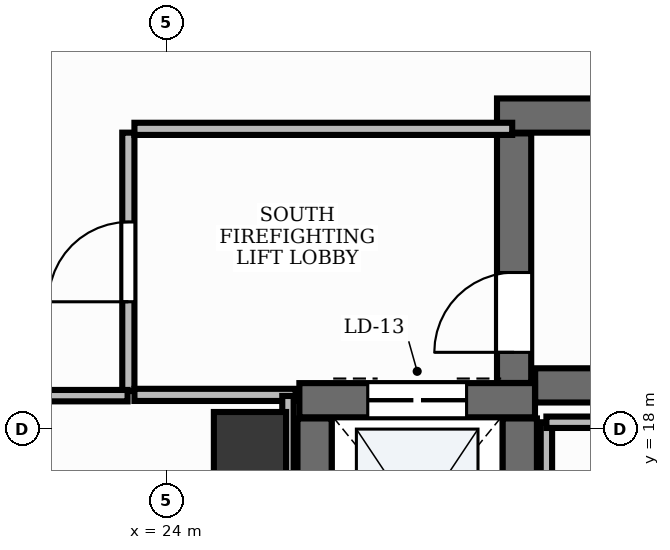
"""IFC4 building model, lengths in metres.
Left out: names, types, materials, properties, quantities, classifications, styles, units other than length and angle.
Written with IfcOpenShell. Run it as: python <this file> out.ifc"""

import sys

from ifc_helpers import new_model, si_unit, direction, frame, frame_2d, origin, origin_2d, place, context, subcontext, project, spatial, rectangle, extrude, element, fill, save


model = new_model("IFC4")
c1 = context("Model", 3, precision=1e-05, world=origin(), true_north=direction((0.0, 1.0)))
c2 = subcontext(c1, "Body", "Model", "MODEL_VIEW")
j1 = project(units=[si_unit("LENGTHUNIT", "METRE"), si_unit("PLANEANGLEUNIT", "RADIAN")], contexts=[c1])
p1 = place(None, origin())
s1 = spatial("IfcSite", under=j1, at=p1, CompositionType="ELEMENT")
p2 = place(p1, origin())
s2 = spatial("IfcBuilding", under=s1, at=p2, CompositionType="ELEMENT")
p3 = place(p2, frame((0.0, 0.0, 106.8)))
s3 = spatial("IfcBuildingStorey", under=s2, at=p3, CompositionType="ELEMENT", Elevation=106.8)
p4 = place(p3, frame((28.852, 18.575, 0.0), z_axis=(0.0, 0.0, 1.0), x_axis=(1.0, 0.0, 0.0)))
e1 = element("IfcWall", 1, at=p4, inside=s3, PredefinedType="SHEAR", context=c2, shape_type="SweptSolid", body=[
    extrude(rectangle(XDim=8.248, YDim=0.45, at=frame_2d((4.124, 0.0))), origin(), (0.0, 0.0, 1.0), 3.9),
])
p5 = place(p3, frame((28.35, 22.125, 0.0), z_axis=(0.0, 0.0, 1.0), x_axis=(1.0, 0.0, 0.0)))
e2 = element("IfcWall", 2, at=p5, inside=s3, PredefinedType="SHEAR", context=c2, shape_type="SweptSolid", body=[
    extrude(rectangle(XDim=8.75, YDim=0.45, at=frame_2d((4.375, 0.0))), origin(), (0.0, 0.0, 1.0), 3.9),
])
p6 = place(p3, frame((28.575, 18.607, 0.0), z_axis=(0.0, 0.0, 1.0), x_axis=(0.0, 1.0, 0.0)))
e3 = element("IfcWall", 3, at=p6, inside=s3, PredefinedType="SHEAR", context=c2, shape_type="SweptSolid", body=[
    extrude(rectangle(XDim=3.283, YDim=0.45, at=frame_2d((1.642, 0.0))), origin(), (0.0, 0.0, 1.0), 3.9),
])
p7 = place(p6, frame((0.403, 0.0, 0.0)))
e4 = element("IfcOpeningElement", 4, at=p7, cuts=e3, PredefinedType="OPENING", context=c2, shape_type="SweptSolid", body=[
    extrude(rectangle(XDim=1.05, YDim=2.15, at=frame_2d((0.525, 1.075))), frame((0.0, 0.24, 0.0), z_axis=(0.0, -1.0, 0.0), x_axis=(1.0, 0.0, 0.0)), (0.0, 0.0, 1.0), 0.48),
])
p8 = place(p3, frame((25.75, 18.38, 0.0), z_axis=(0.0, 0.0, 1.0), x_axis=(1.0, 0.0, 0.0)))
e5 = element("IfcWall", 5, at=p8, inside=s3, PredefinedType="SHEAR", context=c2, shape_type="SweptSolid", body=[
    extrude(rectangle(XDim=3.1, YDim=0.45, at=frame_2d((1.55, 0.0))), origin(), (0.0, 0.0, 1.0), 3.9),
])
p9 = place(p8, frame((0.9, 0.0, 0.0)))
e6 = element("IfcOpeningElement", 6, at=p9, cuts=e5, PredefinedType="OPENING", context=c2, shape_type="SweptSolid", body=[
    extrude(rectangle(XDim=1.3, YDim=2.2, at=frame_2d((0.65, 1.1))), frame((0.0, 0.24, 0.0), z_axis=(0.0, -1.0, 0.0), x_axis=(1.0, 0.0, 0.0)), (0.0, 0.0, 1.0), 0.48),
])
for number, where, z_axis, x_axis in (
    (7, (25.95, 15.44, 0.0), (0.0, 0.0, 1.0), (0.0, 1.0, 0.0)),
    (8, (28.65, 15.44, 0.0), (0.0, 0.0, 1.0), (0.0, 1.0, 0.0)),
):
    element("IfcWall", number, at=place(p3, frame(where, z_axis=z_axis, x_axis=x_axis)), inside=s3, PredefinedType="SHEAR", context=c2, shape_type="SweptSolid", body=[
        extrude(rectangle(XDim=2.7, YDim=0.45, at=frame_2d((1.35, 0.0))), origin(), (0.0, 0.0, 1.0), 3.9),
    ])
p10 = place(p3, frame((25.1, 17.75, -0.0), z_axis=(0.0, 0.0, 1.0), x_axis=(1.0, 0.0, 0.0)))
e9 = element("IfcColumn", 9, at=p10, inside=s3, PredefinedType="PILASTER", context=c2, shape_type="SweptSolid", body=[
    extrude(rectangle(XDim=0.95, YDim=0.95, at=origin_2d()), origin(), (0.0, 0.0, 1.0), 3.901),
])
p11 = place(p3, frame((23.5, 18.5, 0.0), z_axis=(0.0, 0.0, 1.0), x_axis=(0.0, 1.0, 0.0)))
e10 = element("IfcWall", 10, at=p11, inside=s3, PredefinedType="PARTITIONING", context=c2, shape_type="SweptSolid", body=[
    extrude(rectangle(XDim=3.4, YDim=0.16, at=frame_2d((1.7, 0.0))), origin(), (0.0, 0.0, 1.0), 2.91),
])
p12 = place(p11, frame((1.175, 0.0, 0.0)))
e11 = element("IfcOpeningElement", 11, at=p12, cuts=e10, PredefinedType="OPENING", context=c2, shape_type="SweptSolid", body=[
    extrude(rectangle(XDim=1.05, YDim=2.15, at=frame_2d((0.525, 1.075))), frame((0.0, 0.095, 0.0), z_axis=(0.0, -1.0, 0.0), x_axis=(1.0, 0.0, 0.0)), (0.0, 0.0, 1.0), 0.19),
])
p13 = place(p3, frame((23.58, 21.95, 0.0), z_axis=(0.0, 0.0, 1.0), x_axis=(1.0, 0.0, 0.0)))
e12 = element("IfcWall", 12, at=p13, inside=s3, PredefinedType="PARTITIONING", context=c2, shape_type="SweptSolid", body=[
    extrude(rectangle(XDim=4.97, YDim=0.16, at=frame_2d((2.485, 0.0))), origin(), (0.0, 0.0, 1.0), 2.91),
])
p14 = place(p3, frame((23.58, 18.45, 0.0), z_axis=(0.0, 0.0, 1.0), x_axis=(1.0, 0.0, 0.0)))
e13 = element("IfcWall", 13, at=p14, inside=s3, PredefinedType="PARTITIONING", context=c2, shape_type="SweptSolid", body=[
    extrude(rectangle(XDim=2.12, YDim=0.16, at=frame_2d((1.06, 0.0))), origin(), (0.0, 0.0, 1.0), 2.91),
])
p15 = place(p3, frame((11.59, 18.44, 0.0), z_axis=(0.0, 0.0, 1.0), x_axis=(1.0, 0.0, 0.0)))
e14 = element("IfcWall", 14, at=p15, inside=s3, PredefinedType="PARTITIONING", context=c2, shape_type="SweptSolid", body=[
    extrude(rectangle(XDim=11.9, YDim=0.15, at=frame_2d((5.95, 0.0))), origin(), (0.0, 0.0, 1.0), 2.91),
])
p16 = place(p15, frame((1.27, 0.0, 0.0)))
e15 = element("IfcOpeningElement", 15, at=p16, cuts=e14, PredefinedType="OPENING", context=c2, shape_type="SweptSolid", body=[
    extrude(rectangle(XDim=0.95, YDim=2.15, at=frame_2d((0.475, 1.075))), frame((0.0, 0.09, 0.0), z_axis=(0.0, -1.0, 0.0), x_axis=(1.0, 0.0, 0.0)), (0.0, 0.0, 1.0), 0.18),
])
p17 = place(p3, frame((25.6, 18.436, 0.0), z_axis=(0.0, 0.0, 1.0), x_axis=(0.0, -1.0, 0.0)))
e16 = element("IfcWall", 16, at=p17, inside=s3, PredefinedType="PARTITIONING", context=c2, shape_type="SweptSolid", body=[
    extrude(rectangle(XDim=3.482, YDim=0.15, at=frame_2d((1.741, 0.0))), origin(), (0.0, 0.0, 1.0), 2.91),
])
p18 = place(p3, frame((29.0, 14.954, 0.0), z_axis=(0.0, 0.0, 1.0), x_axis=(0.0, 1.0, 0.0)))
e17 = element("IfcWall", 17, at=p18, inside=s3, PredefinedType="PARTITIONING", context=c2, shape_type="SweptSolid", body=[
    extrude(rectangle(XDim=3.136, YDim=0.15, at=frame_2d((1.568, 0.0))), origin(), (0.0, 0.0, 1.0), 2.91),
])
p19 = place(p3, frame((29.0, 18.09, 0.0), z_axis=(0.0, 0.0, 1.0), x_axis=(1.0, 0.0, 0.0)))
e18 = element("IfcWall", 18, at=p19, inside=s3, PredefinedType="PARTITIONING", context=c2, shape_type="SweptSolid", body=[
    extrude(rectangle(XDim=8.35, YDim=0.15, at=frame_2d((4.175, 0.0))), origin(), (0.0, 0.0, 1.0), 2.91),
])
p20 = place(p7, origin())
e19 = element("IfcDoor", 19, at=p20, inside=s3, OperationType="SINGLE_SWING_LEFT", PredefinedType="DOOR", context=c2, shape_type="SweptSolid", body=[
    extrude(rectangle(XDim=1.05, YDim=2.15, at=frame_2d((0.525, 1.075))), frame((0.0, 0.025, 0.0), z_axis=(0.0, -1.0, 0.0), x_axis=(1.0, 0.0, 0.0)), (0.0, 0.0, 1.0), 0.05),
])
fill(e4, e19)
p21 = place(p9, origin())
e20 = element("IfcDoor", 20, at=p21, inside=s3, OperationType="DOUBLE_DOOR_SLIDING", PredefinedType="DOOR", context=c2, shape_type="SweptSolid", body=[
    extrude(rectangle(XDim=1.3, YDim=2.2, at=frame_2d((0.65, 1.1))), frame((0.0, 0.025, 0.0), z_axis=(0.0, -1.0, 0.0), x_axis=(1.0, 0.0, 0.0)), (0.0, 0.0, 1.0), 0.05),
])
fill(e6, e20)
p22 = place(p12, origin())
e21 = element("IfcDoor", 21, at=p22, inside=s3, OperationType="SINGLE_SWING_LEFT", PredefinedType="DOOR", context=c2, shape_type="SweptSolid", body=[
    extrude(rectangle(XDim=1.05, YDim=2.15, at=frame_2d((0.525, 1.075))), frame((0.0, 0.025, 0.0), z_axis=(0.0, -1.0, 0.0), x_axis=(1.0, 0.0, 0.0)), (0.0, 0.0, 1.0), 0.05),
])
fill(e11, e21)
save(model, sys.argv[1])
